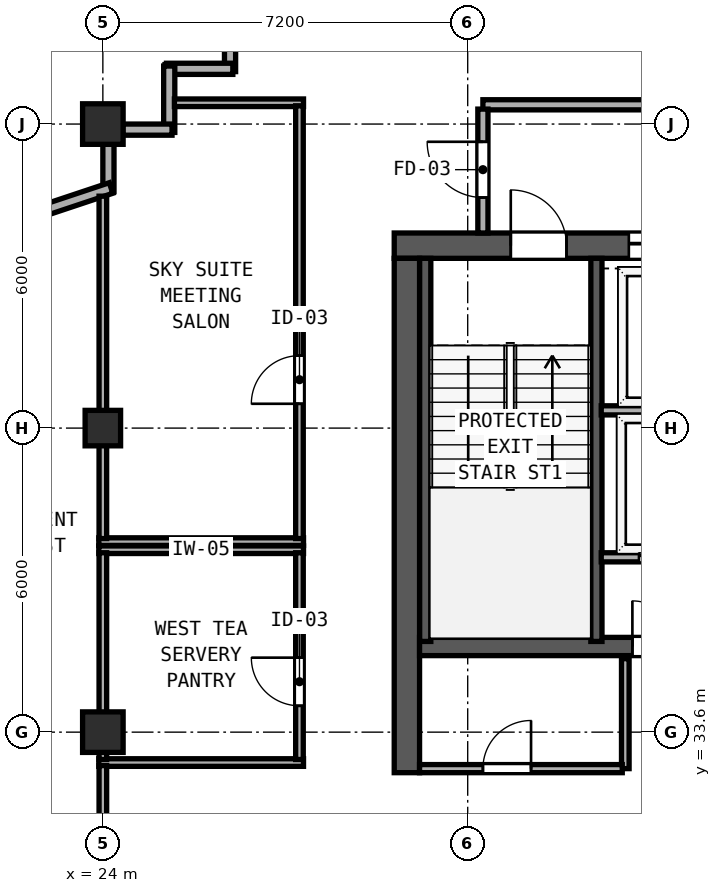
"""IFC4 building model, lengths in metres.
Left out: names, types, materials, properties, quantities, classifications, styles, units other than length and angle.
Written with IfcOpenShell. Run it as: python <this file> out.ifc"""

import sys

from ifc_helpers import new_model, si_unit, direction, frame, frame_2d, origin, origin_2d, place, context, subcontext, project, spatial, rectangle, hollow_rectangle, extrude, element, fill, save


model = new_model("IFC4")
c1 = context("Model", 3, precision=1e-05, world=origin(), true_north=direction((0.0, 1.0)))
c2 = subcontext(c1, "Body", "Model", "MODEL_VIEW")
j1 = project(units=[si_unit("LENGTHUNIT", "METRE"), si_unit("PLANEANGLEUNIT", "RADIAN")], contexts=[c1])
p1 = place(None, origin())
s1 = spatial("IfcSite", under=j1, at=p1, CompositionType="ELEMENT")
p2 = place(p1, origin())
s2 = spatial("IfcBuilding", under=s1, at=p2, CompositionType="ELEMENT")
p3 = place(p2, frame((0.0, 0.0, 258.3)))
s3 = spatial("IfcBuildingStorey", under=s2, at=p3, CompositionType="ELEMENT", Elevation=258.3)
p4 = place(p3, frame((29.75, 43.2, 0.0), z_axis=(0.0, 0.0, 1.0), x_axis=(1.0, 0.0, 0.0)))
e1 = element("IfcWall", 1, at=p4, inside=s3, PredefinedType="SHEAR", context=c2, shape_type="SweptSolid", body=[
    extrude(rectangle(XDim=17.3, YDim=0.5, at=frame_2d((8.65, 0.0))), origin(), (0.0, 0.0, 1.0), 3.67),
])
p5 = place(p4, frame((2.3, 0.0, 0.0)))
e2 = element("IfcOpeningElement", 2, at=p5, cuts=e1, PredefinedType="OPENING", context=c2, shape_type="SweptSolid", body=[
    extrude(rectangle(XDim=1.1, YDim=2.15, at=frame_2d((0.55, 1.075))), frame((0.0, 0.26, 0.0), z_axis=(0.0, -1.0, 0.0), x_axis=(1.0, 0.0, 0.0)), (0.0, 0.0, 1.0), 0.52),
])
p6 = place(p4, frame((7.41, 0.0, 0.0)))
e3 = element("IfcOpeningElement", 3, at=p6, cuts=e1, PredefinedType="OPENING", context=c2, shape_type="SweptSolid", body=[
    extrude(rectangle(XDim=1.1, YDim=2.15, at=frame_2d((0.55, 1.075))), frame((0.0, 0.26, 0.0), z_axis=(0.0, -1.0, 0.0), x_axis=(1.0, 0.0, 0.0)), (0.0, 0.0, 1.0), 0.52),
])
p7 = place(p4, frame((13.5, 0.0, 0.0)))
e4 = element("IfcOpeningElement", 4, at=p7, cuts=e1, PredefinedType="OPENING", context=c2, shape_type="SweptSolid", body=[
    extrude(rectangle(XDim=1.1, YDim=2.15, at=frame_2d((0.55, 1.075))), frame((0.0, 0.26, 0.0), z_axis=(0.0, -1.0, 0.0), x_axis=(1.0, 0.0, 0.0)), (0.0, 0.0, 1.0), 0.52),
])
p8 = place(p4, frame((4.63, 0.0, 0.0)))
e5 = element("IfcOpeningElement", 5, at=p8, cuts=e1, PredefinedType="OPENING", context=c2, shape_type="SweptSolid", body=[
    extrude(rectangle(XDim=1.1, YDim=2.2, at=frame_2d((0.55, 1.1))), frame((0.0, 0.26, 0.0), z_axis=(0.0, -1.0, 0.0), x_axis=(1.0, 0.0, 0.0)), (0.0, 0.0, 1.0), 0.52),
])
p9 = place(p4, frame((10.99, 0.0, 0.0)))
e6 = element("IfcOpeningElement", 6, at=p9, cuts=e1, PredefinedType="OPENING", context=c2, shape_type="SweptSolid", body=[
    extrude(rectangle(XDim=1.1, YDim=2.2, at=frame_2d((0.55, 1.1))), frame((0.0, 0.26, 0.0), z_axis=(0.0, -1.0, 0.0), x_axis=(1.0, 0.0, 0.0)), (0.0, 0.0, 1.0), 0.52),
])
p10 = place(p3, frame((30.0, 32.8, 0.0), z_axis=(0.0, 0.0, 1.0), x_axis=(0.0, 1.0, 0.0)))
e7 = element("IfcWall", 7, at=p10, inside=s3, PredefinedType="SHEAR", context=c2, shape_type="SweptSolid", body=[
    extrude(rectangle(XDim=10.15, YDim=0.5, at=frame_2d((5.075, 0.0))), origin(), (0.0, 0.0, 1.0), 3.67),
])
p11 = place(p3, frame((30.25, 35.29, 0.0), z_axis=(0.0, 0.0, 1.0), x_axis=(1.0, 0.0, 0.0)))
e8 = element("IfcWall", 8, at=p11, inside=s3, PredefinedType="SHEAR", context=c2, shape_type="SweptSolid", body=[
    extrude(rectangle(XDim=16.3, YDim=0.36, at=frame_2d((8.15, 0.0))), origin(), (0.0, 0.0, 1.0), 3.67),
])
p12 = place(p11, frame((5.1, 0.0, 0.0), z_axis=(0.0, 0.0, 1.0), x_axis=(-1.0, 0.0, 0.0)))
e9 = element("IfcOpeningElement", 9, at=p12, cuts=e8, PredefinedType="OPENING", context=c2, shape_type="SweptSolid", body=[
    extrude(rectangle(XDim=0.9, YDim=2.1, at=frame_2d((0.45, 1.05))), frame((0.0, 0.19, 0.0), z_axis=(0.0, -1.0, 0.0), x_axis=(1.0, 0.0, 0.0)), (0.0, 0.0, 1.0), 0.38),
])
p13 = place(p11, frame((12.16, 0.0, 0.0), z_axis=(0.0, 0.0, 1.0), x_axis=(-1.0, 0.0, 0.0)))
e10 = element("IfcOpeningElement", 10, at=p13, cuts=e8, PredefinedType="OPENING", context=c2, shape_type="SweptSolid", body=[
    extrude(rectangle(XDim=0.9, YDim=2.1, at=frame_2d((0.45, 1.05))), frame((0.0, 0.19, 0.0), z_axis=(0.0, -1.0, 0.0), x_axis=(1.0, 0.0, 0.0)), (0.0, 0.0, 1.0), 0.38),
])
for number, where, z_axis, x_axis in (
    (11, (30.362, 35.39, 0.0), (0.0, 0.0, 1.0), (0.0, 1.0, 0.0)),
    (12, (33.74, 35.39, 0.0), (0.0, 0.0, 1.0), (0.0, 1.0, 0.0)),
):
    element("IfcWall", number, at=place(p3, frame(where, z_axis=z_axis, x_axis=x_axis)), inside=s3, PredefinedType="SHEAR", context=c2, shape_type="SweptSolid", body=[
        extrude(rectangle(XDim=7.56, YDim=0.22, at=frame_2d((3.78, 0.0))), origin(), (0.0, 0.0, 1.0), 3.67),
    ])
for number, where, z_axis, x_axis in (
    (13, (24.0, 33.6, 0.0), (0.0, 0.0, 1.0), (1.0, 0.0, 0.0)),
    (14, (24.0, 45.6, 0.0), (0.0, 0.0, 1.0), (1.0, 0.0, 0.0)),
):
    element("IfcColumn", number, at=place(p3, frame(where, z_axis=z_axis, x_axis=x_axis)), inside=s3, PredefinedType="COLUMN", context=c2, shape_type="SweptSolid", body=[
        extrude(hollow_rectangle(XDim=0.8, YDim=0.8, WallThickness=0.03, at=origin_2d()), origin(), (0.0, 0.0, 1.0), 3.85),
    ])
p14 = place(p3, frame((24.0, 39.6, 0.0), z_axis=(0.0, 0.0, 1.0), x_axis=(1.0, 0.0, 0.0)))
e15 = element("IfcColumn", 15, at=p14, inside=s3, PredefinedType="COLUMN", context=c2, shape_type="SweptSolid", body=[
    extrude(hollow_rectangle(XDim=0.7, YDim=0.7, WallThickness=0.026, at=origin_2d()), origin(), (0.0, 0.0, 1.0), 3.85),
])
p15 = place(p3, frame((26.51, 48.0, 0.0), z_axis=(0.0, 0.0, 1.0), x_axis=(0.0, -1.0, 0.0)))
e16 = element("IfcWall", 16, at=p15, inside=s3, PredefinedType="SOLIDWALL", context=c2, shape_type="SweptSolid", body=[
    extrude(rectangle(XDim=1.365, YDim=0.22, at=frame_2d((0.683, 0.0))), origin(), (0.0, 0.0, 1.0), 3.67),
])
for number, where, z_axis, x_axis in (
    (17, (26.565, 46.69, 0.0), (0.0, 0.0, 1.0), (-1.0, 0.0, 0.0)),
    (18, (25.31, 46.745, 0.0), (0.0, 0.0, 1.0), (0.0, -1.0, 0.0)),
):
    element("IfcWall", number, at=place(p3, frame(where, z_axis=z_axis, x_axis=x_axis)), inside=s3, PredefinedType="SOLIDWALL", context=c2, shape_type="SweptSolid", body=[
        extrude(rectangle(XDim=1.31, YDim=0.22, at=frame_2d((0.655, 0.0))), origin(), (0.0, 0.0, 1.0), 3.67),
    ])
p16 = place(p3, frame((25.365, 45.49, 0.0), z_axis=(0.0, 0.0, 1.0), x_axis=(-1.0, 0.0, 0.0)))
e19 = element("IfcWall", 19, at=p16, inside=s3, PredefinedType="SOLIDWALL", context=c2, shape_type="SweptSolid", body=[
    extrude(rectangle(XDim=0.973, YDim=0.22, at=frame_2d((0.486, 0.0))), origin(), (0.0, 0.0, 1.0), 3.67),
])
p17 = place(p3, frame((24.11, 45.208, 0.0), z_axis=(0.0, 0.0, 1.0), x_axis=(0.0, -1.0, 0.0)))
e20 = element("IfcWall", 20, at=p17, inside=s3, PredefinedType="SOLIDWALL", context=c2, shape_type="SweptSolid", body=[
    extrude(rectangle(XDim=0.942, YDim=0.22, at=frame_2d((0.471, 0.0))), origin(), (0.0, 0.0, 1.0), 3.315),
])
p18 = place(p3, frame((24.162, 44.338, 0.0), z_axis=(0.0, 0.0, 1.0), x_axis=(-0.948687165594, -0.31621616315, 0.0)))
e21 = element("IfcWall", 21, at=p18, inside=s3, PredefinedType="SOLIDWALL", context=c2, shape_type="SweptSolid", body=[
    extrude(rectangle(XDim=6.312, YDim=0.22, at=frame_2d((3.156, 0.0))), origin(), (0.0, 0.0, 1.0), 3.315),
])
p19 = place(p18, frame((1.6, 0.0, 0.85)))
e22 = element("IfcOpeningElement", 22, at=p19, cuts=e21, PredefinedType="OPENING", context=c2, shape_type="SweptSolid", body=[
    extrude(rectangle(XDim=1.25, YDim=1.95, at=frame_2d((0.625, 0.975))), frame((0.0, 0.12, 0.0), z_axis=(0.0, -1.0, 0.0), x_axis=(1.0, 0.0, 0.0)), (0.0, 0.0, 1.0), 0.24),
])
p20 = place(p18, frame((4.682, 0.0, 0.85)))
e23 = element("IfcOpeningElement", 23, at=p20, cuts=e21, PredefinedType="OPENING", context=c2, shape_type="SweptSolid", body=[
    extrude(rectangle(XDim=1.25, YDim=1.95, at=frame_2d((0.625, 0.975))), frame((0.0, 0.12, 0.0), z_axis=(0.0, -1.0, 0.0), x_axis=(1.0, 0.0, 0.0)), (0.0, 0.0, 1.0), 0.24),
])
p21 = place(p3, frame((31.5, 45.98, 0.0), z_axis=(0.0, 0.0, 1.0), x_axis=(1.0, 0.0, 0.0)))
e24 = element("IfcWall", 24, at=p21, inside=s3, PredefinedType="SOLIDWALL", context=c2, shape_type="SweptSolid", body=[
    extrude(rectangle(XDim=13.8, YDim=0.2, at=frame_2d((6.9, 0.0))), origin(), (0.0, 0.0, 1.0), 3.67),
])
p22 = place(p3, frame((31.5, 43.45, 0.0), z_axis=(0.0, 0.0, 1.0), x_axis=(0.0, 1.0, 0.0)))
e25 = element("IfcWall", 25, at=p22, inside=s3, PredefinedType="SOLIDWALL", context=c2, shape_type="SweptSolid", body=[
    extrude(rectangle(XDim=2.445, YDim=0.2, at=frame_2d((1.223, 0.0))), origin(), (0.0, 0.0, 1.0), 3.67),
])
p23 = place(p22, frame((1.8, 0.0, 0.0), z_axis=(0.0, 0.0, 1.0), x_axis=(-1.0, 0.0, 0.0)))
e26 = element("IfcOpeningElement", 26, at=p23, cuts=e25, PredefinedType="OPENING", context=c2, shape_type="SweptSolid", body=[
    extrude(rectangle(XDim=1.1, YDim=2.15, at=frame_2d((0.55, 1.075))), frame((0.0, 0.11, 0.0), z_axis=(0.0, -1.0, 0.0), x_axis=(1.0, 0.0, 0.0)), (0.0, 0.0, 1.0), 0.22),
])
p24 = place(p3, frame((33.835, 39.95, 0.0), z_axis=(0.0, 0.0, 1.0), x_axis=(1.0, 0.0, 0.0)))
e27 = element("IfcWall", 27, at=p24, inside=s3, PredefinedType="SOLIDWALL", context=c2, shape_type="SweptSolid", body=[
    extrude(rectangle(XDim=2.77, YDim=0.18, at=frame_2d((1.385, 0.0))), origin(), (0.0, 0.0, 1.0), 3.67),
])
p25 = place(p3, frame((33.835, 37.05, 0.0), z_axis=(0.0, 0.0, 1.0), x_axis=(1.0, 0.0, 0.0)))
e28 = element("IfcWall", 28, at=p25, inside=s3, PredefinedType="SOLIDWALL", context=c2, shape_type="SweptSolid", body=[
    extrude(rectangle(XDim=2.77, YDim=0.18, at=frame_2d((1.385, 0.0))), origin(), (0.0, 0.0, 1.0), 3.67),
])
p26 = place(p25, frame((1.945, 0.0, 0.0), z_axis=(0.0, 0.0, 1.0), x_axis=(-1.0, 0.0, 0.0)))
e29 = element("IfcOpeningElement", 29, at=p26, cuts=e28, PredefinedType="OPENING", context=c2, shape_type="SweptSolid", body=[
    extrude(rectangle(XDim=1.2, YDim=2.2, at=frame_2d((0.6, 1.1))), frame((0.0, 0.1, 0.0), z_axis=(0.0, -1.0, 0.0), x_axis=(1.0, 0.0, 0.0)), (0.0, 0.0, 1.0), 0.2),
])
p27 = place(p3, frame((34.31, 32.88, 0.0), z_axis=(0.0, 0.0, 1.0), x_axis=(0.0, 1.0, 0.0)))
e30 = element("IfcWall", 30, at=p27, inside=s3, PredefinedType="SOLIDWALL", context=c2, shape_type="SweptSolid", body=[
    extrude(rectangle(XDim=2.17, YDim=0.15, at=frame_2d((1.085, 0.0))), origin(), (0.0, 0.0, 1.0), 3.67),
])
p28 = place(p3, frame((30.25, 32.88, 0.0), z_axis=(0.0, 0.0, 1.0), x_axis=(1.0, 0.0, 0.0)))
e31 = element("IfcWall", 31, at=p28, inside=s3, PredefinedType="SOLIDWALL", context=c2, shape_type="SweptSolid", body=[
    extrude(rectangle(XDim=4.0, YDim=0.16, at=frame_2d((2.0, 0.0))), origin(), (0.0, 0.0, 1.0), 3.67),
])
p29 = place(p28, frame((2.2, 0.0, 0.0), z_axis=(0.0, 0.0, 1.0), x_axis=(-1.0, 0.0, 0.0)))
e32 = element("IfcOpeningElement", 32, at=p29, cuts=e31, PredefinedType="OPENING", context=c2, shape_type="SweptSolid", body=[
    extrude(rectangle(XDim=0.95, YDim=2.12, at=frame_2d((0.475, 1.06))), frame((0.0, 0.09, 0.0), z_axis=(0.0, -1.0, 0.0), x_axis=(1.0, 0.0, 0.0)), (0.0, 0.0, 1.0), 0.18),
])
for number, where, z_axis, x_axis in (
    (33, (23.92, 37.2, 0.0), (0.0, 0.0, 1.0), (1.0, 0.0, 0.0)),
    (34, (23.92, 33.0, 0.0), (0.0, 0.0, 1.0), (1.0, 0.0, 0.0)),
):
    element("IfcWall", number, at=place(p3, frame(where, z_axis=z_axis, x_axis=x_axis)), inside=s3, PredefinedType="PARTITIONING", context=c2, shape_type="SweptSolid", body=[
        extrude(rectangle(XDim=4.04, YDim=0.15, at=frame_2d((2.02, 0.0))), origin(), (0.0, 0.0, 1.0), 3.67),
    ])
p30 = place(p3, frame((24.0, 33.06, 0.0), z_axis=(0.0, 0.0, 1.0), x_axis=(0.0, 1.0, 0.0)))
e35 = element("IfcWall", 35, at=p30, inside=s3, PredefinedType="PARTITIONING", context=c2, shape_type="SweptSolid", body=[
    extrude(rectangle(XDim=4.08, YDim=0.15, at=frame_2d((2.04, 0.0))), origin(), (0.0, 0.0, 1.0), 3.315),
])
p31 = place(p3, frame((27.88, 33.06, 0.0), z_axis=(0.0, 0.0, 1.0), x_axis=(0.0, 1.0, 0.0)))
e36 = element("IfcWall", 36, at=p31, inside=s3, PredefinedType="PARTITIONING", context=c2, shape_type="SweptSolid", body=[
    extrude(rectangle(XDim=4.08, YDim=0.15, at=frame_2d((2.04, 0.0))), origin(), (0.0, 0.0, 1.0), 3.67),
])
p32 = place(p31, frame((2.01, 0.0, 0.0), z_axis=(0.0, 0.0, 1.0), x_axis=(-1.0, 0.0, 0.0)))
e37 = element("IfcOpeningElement", 37, at=p32, cuts=e36, PredefinedType="OPENING", context=c2, shape_type="SweptSolid", body=[
    extrude(rectangle(XDim=0.95, YDim=2.12, at=frame_2d((0.475, 1.06))), frame((0.0, 0.085, 0.0), z_axis=(0.0, -1.0, 0.0), x_axis=(1.0, 0.0, 0.0)), (0.0, 0.0, 1.0), 0.17),
])
p33 = place(p3, frame((25.412, 46.02, 0.0), z_axis=(0.0, 0.0, 1.0), x_axis=(1.0, 0.0, 0.0)))
e38 = element("IfcWall", 38, at=p33, inside=s3, PredefinedType="PARTITIONING", context=c2, shape_type="SweptSolid", body=[
    extrude(rectangle(XDim=2.548, YDim=0.15, at=frame_2d((1.274, 0.0))), origin(), (0.0, 0.0, 1.0), 3.67),
])
p34 = place(p3, frame((23.92, 37.36, 0.0), z_axis=(0.0, 0.0, 1.0), x_axis=(1.0, 0.0, 0.0)))
e39 = element("IfcWall", 39, at=p34, inside=s3, PredefinedType="PARTITIONING", context=c2, shape_type="SweptSolid", body=[
    extrude(rectangle(XDim=4.04, YDim=0.15, at=frame_2d((2.02, 0.0))), origin(), (0.0, 0.0, 1.0), 3.67),
])
p35 = place(p3, frame((24.0, 37.42, 0.0), z_axis=(0.0, 0.0, 1.0), x_axis=(0.0, 1.0, 0.0)))
e40 = element("IfcWall", 40, at=p35, inside=s3, PredefinedType="PARTITIONING", context=c2, shape_type="SweptSolid", body=[
    extrude(rectangle(XDim=6.757, YDim=0.15, at=frame_2d((3.378, 0.0))), origin(), (0.0, 0.0, 1.0), 3.315),
])
p36 = place(p3, frame((27.88, 37.42, 0.0), z_axis=(0.0, 0.0, 1.0), x_axis=(0.0, 1.0, 0.0)))
e41 = element("IfcWall", 41, at=p36, inside=s3, PredefinedType="PARTITIONING", context=c2, shape_type="SweptSolid", body=[
    extrude(rectangle(XDim=8.54, YDim=0.15, at=frame_2d((4.27, 0.0))), origin(), (0.0, 0.0, 1.0), 3.67),
])
p37 = place(p36, frame((3.61, 0.0, 0.0), z_axis=(0.0, 0.0, 1.0), x_axis=(-1.0, 0.0, 0.0)))
e42 = element("IfcOpeningElement", 42, at=p37, cuts=e41, PredefinedType="OPENING", context=c2, shape_type="SweptSolid", body=[
    extrude(rectangle(XDim=0.95, YDim=2.12, at=frame_2d((0.475, 1.06))), frame((0.0, 0.085, 0.0), z_axis=(0.0, -1.0, 0.0), x_axis=(1.0, 0.0, 0.0)), (0.0, 0.0, 1.0), 0.17),
])
p38 = place(p3, frame((24.0, 30.44, 0.0), z_axis=(0.0, 0.0, 1.0), x_axis=(0.0, 1.0, 0.0)))
e43 = element("IfcWall", 43, at=p38, inside=s3, PredefinedType="PARTITIONING", context=c2, shape_type="SweptSolid", body=[
    extrude(rectangle(XDim=2.5, YDim=0.15, at=frame_2d((1.25, 0.0))), origin(), (0.0, 0.0, 1.0), 3.315),
])
p39 = place(p5, origin())
e44 = element("IfcDoor", 44, at=p39, inside=s3, OperationType="SINGLE_SWING_LEFT", PredefinedType="DOOR", context=c2, shape_type="SweptSolid", body=[
    extrude(rectangle(XDim=1.1, YDim=2.15, at=frame_2d((0.55, 1.075))), frame((0.0, 0.185, 0.0), z_axis=(0.0, -1.0, 0.0), x_axis=(1.0, 0.0, 0.0)), (0.0, 0.0, 1.0), 0.05),
])
fill(e2, e44)
p40 = place(p23, origin())
e45 = element("IfcDoor", 45, at=p40, inside=s3, OperationType="SINGLE_SWING_LEFT", PredefinedType="DOOR", context=c2, shape_type="SweptSolid", body=[
    extrude(rectangle(XDim=1.1, YDim=2.15, at=frame_2d((0.55, 1.075))), frame((0.0, 0.025, 0.0), z_axis=(0.0, -1.0, 0.0), x_axis=(1.0, 0.0, 0.0)), (0.0, 0.0, 1.0), 0.05),
])
fill(e26, e45)
p41 = place(p8, origin())
e46 = element("IfcDoor", 46, at=p41, inside=s3, OperationType="SLIDING_TO_LEFT", PredefinedType="DOOR", context=c2, shape_type="SweptSolid", body=[
    extrude(rectangle(XDim=1.1, YDim=2.2, at=frame_2d((0.55, 1.1))), frame((0.0, 0.185, 0.0), z_axis=(0.0, -1.0, 0.0), x_axis=(1.0, 0.0, 0.0)), (0.0, 0.0, 1.0), 0.05),
])
fill(e5, e46)
p42 = place(p26, origin())
e47 = element("IfcDoor", 47, at=p42, inside=s3, OperationType="SLIDING_TO_RIGHT", PredefinedType="DOOR", context=c2, shape_type="SweptSolid", body=[
    extrude(rectangle(XDim=1.2, YDim=2.2, at=frame_2d((0.6, 1.1))), frame((0.0, 0.025, 0.0), z_axis=(0.0, -1.0, 0.0), x_axis=(1.0, 0.0, 0.0)), (0.0, 0.0, 1.0), 0.05),
])
fill(e29, e47)
p43 = place(p12, origin())
e48 = element("IfcDoor", 48, at=p43, inside=s3, OperationType="SINGLE_SWING_RIGHT", PredefinedType="DOOR", context=c2, shape_type="SweptSolid", body=[
    extrude(rectangle(XDim=0.9, YDim=2.1, at=frame_2d((0.45, 1.05))), frame((0.0, 0.025, 0.0), z_axis=(0.0, -1.0, 0.0), x_axis=(1.0, 0.0, 0.0)), (0.0, 0.0, 1.0), 0.05),
])
fill(e9, e48)
p44 = place(p29, origin())
e49 = element("IfcDoor", 49, at=p44, inside=s3, OperationType="SINGLE_SWING_LEFT", PredefinedType="DOOR", context=c2, shape_type="SweptSolid", body=[
    extrude(rectangle(XDim=0.95, YDim=2.12, at=frame_2d((0.475, 1.06))), frame((0.0, 0.025, 0.0), z_axis=(0.0, -1.0, 0.0), x_axis=(1.0, 0.0, 0.0)), (0.0, 0.0, 1.0), 0.05),
])
fill(e32, e49)
p45 = place(p32, origin())
e50 = element("IfcDoor", 50, at=p45, inside=s3, OperationType="SINGLE_SWING_LEFT", PredefinedType="DOOR", context=c2, shape_type="SweptSolid", body=[
    extrude(rectangle(XDim=0.95, YDim=2.12, at=frame_2d((0.475, 1.06))), frame((0.0, 0.025, 0.0), z_axis=(0.0, -1.0, 0.0), x_axis=(1.0, 0.0, 0.0)), (0.0, 0.0, 1.0), 0.05),
])
fill(e37, e50)
p46 = place(p37, origin())
e51 = element("IfcDoor", 51, at=p46, inside=s3, OperationType="SINGLE_SWING_RIGHT", PredefinedType="DOOR", context=c2, shape_type="SweptSolid", body=[
    extrude(rectangle(XDim=0.95, YDim=2.12, at=frame_2d((0.475, 1.06))), frame((0.0, 0.025, 0.0), z_axis=(0.0, -1.0, 0.0), x_axis=(1.0, 0.0, 0.0)), (0.0, 0.0, 1.0), 0.05),
])
fill(e42, e51)
save(model, sys.argv[1])
